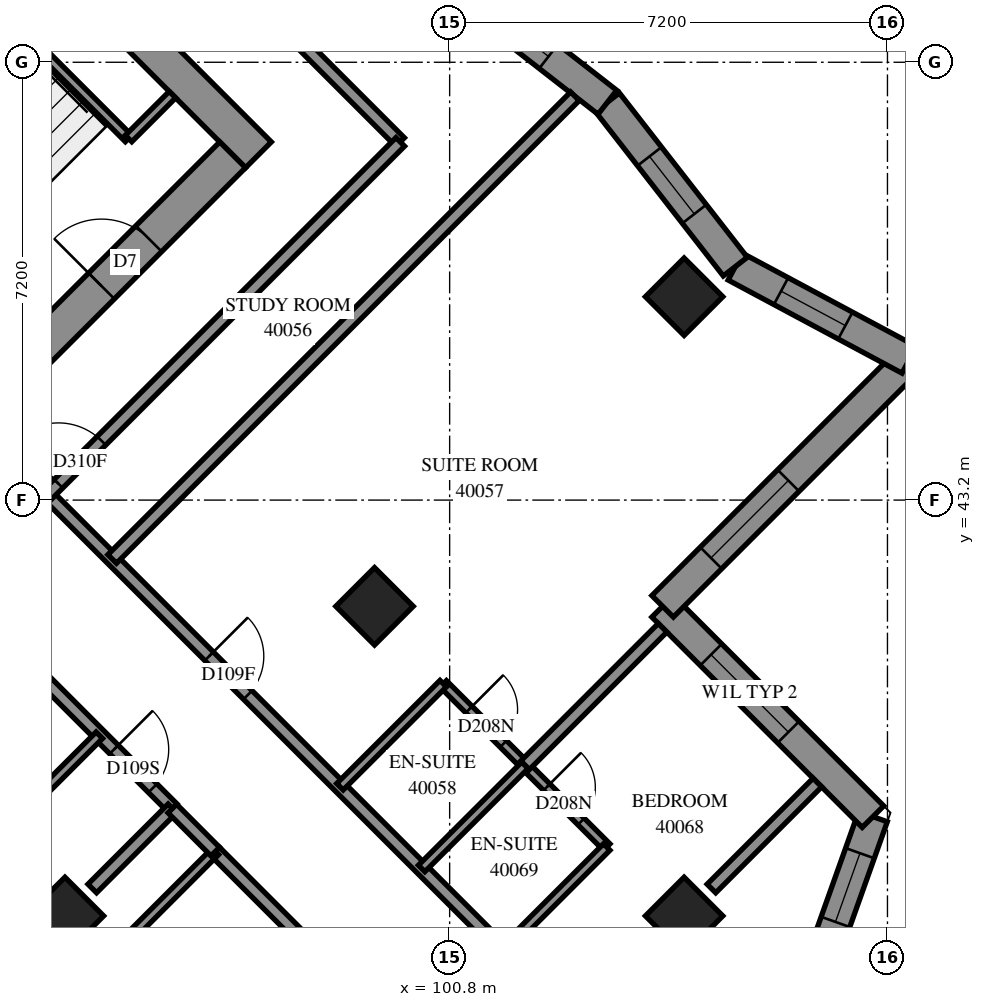
"""IFC4 building model, lengths in metres.
Left out: names, types, materials, properties, quantities, classifications, styles, units other than length and angle.
Written with IfcOpenShell. Run it as: python <this file> out.ifc"""

import sys

from ifc_helpers import new_model, si_unit, direction, frame, frame_2d, origin, origin_2d, place, context, subcontext, project, spatial, polyline, rectangle, outline, extrude, element, fill, save


model = new_model("IFC4")
c1 = context("Model", 3, precision=1e-05, world=origin(), true_north=direction((0.0, 1.0)))
c2 = subcontext(c1, "Body", "Model", "MODEL_VIEW")
j1 = project(units=[si_unit("LENGTHUNIT", "METRE"), si_unit("PLANEANGLEUNIT", "RADIAN")], contexts=[c1])
p1 = place(None, origin())
s1 = spatial("IfcSite", under=j1, at=p1, CompositionType="ELEMENT")
p2 = place(p1, origin())
s2 = spatial("IfcBuilding", under=s1, at=p2, CompositionType="ELEMENT")
p3 = place(p2, frame((0.0, 0.0, 149.0)))
s3 = spatial("IfcBuildingStorey", under=s2, at=p3, CompositionType="ELEMENT", Elevation=149.0)
for number, where, z_axis, x_axis in (
    (1, (104.656, 46.544, 0.0), (0.0, 0.0, 1.0), (0.707, -0.707, 0.0)),
    (2, (99.565, 41.453, 0.0), (0.0, 0.0, 1.0), (0.707, -0.707, 0.0)),
    (3, (94.474, 36.362, 0.0), (0.0, 0.0, 1.0), (0.707, -0.707, 0.0)),
    (4, (104.656, 36.362, 0.0), (0.0, 0.0, 1.0), (0.707, -0.707, 0.0)),
):
    element("IfcColumn", number, at=place(p3, frame(where, z_axis=z_axis, x_axis=x_axis)), inside=s3, PredefinedType="COLUMN", context=c2, shape_type="SweptSolid", body=[
        extrude(rectangle(XDim=0.9, YDim=0.9, at=origin_2d()), origin(), (0.0, 0.0, 1.0), 3.1),
    ])
p4 = place(p3, frame((86.625, 59.908, -0.3), z_axis=(0.0, 0.0, 1.0), x_axis=(0.7071067812, -0.7071067812, 0.0)))
e5 = element("IfcWall", 5, at=p4, inside=s3, PredefinedType="SHEAR", context=c2, shape_type="SweptSolid", body=[
    extrude(rectangle(XDim=15.6, YDim=0.6, at=frame_2d((7.8, 0.0))), origin(), (0.0, 0.0, 1.0), 2.7),
])
p5 = place(p4, frame((10.6, 0.0, 0.3)))
e6 = element("IfcOpeningElement", 6, at=p5, cuts=e5, PredefinedType="OPENING", context=c2, shape_type="SweptSolid", body=[
    extrude(rectangle(XDim=0.8, YDim=2.1, at=frame_2d((0.4, 1.05))), frame((0.0, 0.31, 0.0), z_axis=(0.0, -1.0, 0.0), x_axis=(1.0, 0.0, 0.0)), (0.0, 0.0, 1.0), 0.62),
])
p6 = place(p3, frame((87.049, 38.695, -0.3), z_axis=(0.0, 0.0, 1.0), x_axis=(0.7071067812, 0.7071067812, 0.0)))
e7 = element("IfcWall", 7, at=p6, inside=s3, PredefinedType="SHEAR", context=c2, shape_type="SweptSolid", body=[
    extrude(rectangle(XDim=14.4, YDim=0.6, at=frame_2d((7.2, 0.0))), origin(), (0.0, 0.0, 1.0), 2.7),
])
p7 = place(p6, frame((4.55, 0.0, 0.3)))
e8 = element("IfcOpeningElement", 8, at=p7, cuts=e7, PredefinedType="OPENING", context=c2, shape_type="SweptSolid", body=[
    extrude(rectangle(XDim=1.1, YDim=2.1, at=frame_2d((0.55, 1.05))), frame((0.0, 0.31, 0.0), z_axis=(0.0, -1.0, 0.0), x_axis=(1.0, 0.0, 0.0)), (0.0, 0.0, 1.0), 0.62),
])
p8 = place(p6, frame((11.35, 0.0, 0.3)))
e9 = element("IfcOpeningElement", 9, at=p8, cuts=e7, PredefinedType="OPENING", context=c2, shape_type="SweptSolid", body=[
    extrude(rectangle(XDim=1.1, YDim=2.1, at=frame_2d((0.55, 1.05))), frame((0.0, 0.31, 0.0), z_axis=(0.0, -1.0, 0.0), x_axis=(1.0, 0.0, 0.0)), (0.0, 0.0, 1.0), 0.62),
])
p9 = place(p3, frame((105.975, 32.978, 0.0), z_axis=(0.0, 0.0, 1.0), x_axis=(0.3355165031, 0.9420343285, 0.0)))
e10 = element("IfcWall", 10, at=p9, inside=s3, PredefinedType="SOLIDWALL", context=c2, shape_type="SweptSolid", body=[
    extrude(outline(polyline([(-0.114, -0.25), (5.482, -0.25), (5.166, 0.25), (0.114, 0.25), (-0.114, -0.25)])), origin(), (0.0, 0.0, 1.0), 3.1),
])
p10 = place(p9, frame((1.161, 0.0, 0.45)))
e11 = element("IfcOpeningElement", 11, at=p10, cuts=e10, PredefinedType="OPENING", context=c2, shape_type="SweptSolid", body=[
    extrude(rectangle(XDim=1.2, YDim=2.5, at=frame_2d((0.6, 1.25))), frame((0.0, 0.26, 0.0), z_axis=(0.0, -1.0, 0.0), x_axis=(1.0, 0.0, 0.0)), (0.0, 0.0, 1.0), 0.52),
])
p11 = place(p9, frame((3.487, 0.0, 0.45)))
e12 = element("IfcOpeningElement", 12, at=p11, cuts=e10, PredefinedType="OPENING", context=c2, shape_type="SweptSolid", body=[
    extrude(rectangle(XDim=1.2, YDim=2.5, at=frame_2d((0.6, 1.25))), frame((0.0, 0.26, 0.0), z_axis=(0.0, -1.0, 0.0), x_axis=(1.0, 0.0, 0.0)), (0.0, 0.0, 1.0), 0.52),
])
p12 = place(p3, frame((107.761, 37.994, 0.0), z_axis=(0.0, 0.0, 1.0), x_axis=(-0.7071272222, 0.7070863396, 0.0)))
e13 = element("IfcWall", 13, at=p12, inside=s3, PredefinedType="SOLIDWALL", context=c2, shape_type="SweptSolid", body=[
    extrude(outline(polyline([(-0.158, -0.25), (4.642, -0.25), (5.142, 0.25), (0.158, 0.25), (-0.158, -0.25)])), origin(), (0.0, 0.0, 1.0), 3.1),
])
p13 = place(p12, frame((1.967, 0.0, 0.6)))
e14 = element("IfcOpeningElement", 14, at=p13, cuts=e13, PredefinedType="OPENING", context=c2, shape_type="SweptSolid", body=[
    extrude(rectangle(XDim=1.8, YDim=1.9, at=frame_2d((0.9, 0.95))), frame((0.0, 0.26, 0.0), z_axis=(0.0, -1.0, 0.0), x_axis=(1.0, 0.0, 0.0)), (0.0, 0.0, 1.0), 0.52),
])
p14 = place(p3, frame((104.302, 41.453, 0.0), z_axis=(0.0, 0.0, 1.0), x_axis=(0.7071242197, 0.7070893422, 0.0)))
e15 = element("IfcWall", 15, at=p14, inside=s3, PredefinedType="SOLIDWALL", context=c2, shape_type="SweptSolid", body=[
    extrude(outline(polyline([(0.25, -0.25), (6.071, -0.25), (5.397, 0.25), (-0.25, 0.25), (0.25, -0.25)])), origin(), (0.0, 0.0, 1.0), 3.1),
])
p15 = place(p14, frame((1.125, 0.0, 0.6)))
e16 = element("IfcOpeningElement", 16, at=p15, cuts=e15, PredefinedType="OPENING", context=c2, shape_type="SweptSolid", body=[
    extrude(rectangle(XDim=1.8, YDim=1.9, at=frame_2d((0.9, 0.95))), frame((0.0, 0.26, 0.0), z_axis=(0.0, -1.0, 0.0), x_axis=(1.0, 0.0, 0.0)), (0.0, 0.0, 1.0), 0.52),
])
p16 = place(p3, frame((108.357, 45.508, 0.0), z_axis=(0.0, 0.0, 1.0), x_axis=(-0.8815024249, 0.4721794944, 0.0)))
e17 = element("IfcWall", 17, at=p16, inside=s3, PredefinedType="SOLIDWALL", context=c2, shape_type="SweptSolid", body=[
    extrude(outline(polyline([(-0.337, -0.25), (3.191, -0.25), (3.297, 0.25), (0.337, 0.25), (-0.337, -0.25)])), origin(), (0.0, 0.0, 1.0), 3.1),
])
p17 = place(p16, frame((1.19, 0.0, 0.45)))
e18 = element("IfcOpeningElement", 18, at=p17, cuts=e17, PredefinedType="OPENING", context=c2, shape_type="SweptSolid", body=[
    extrude(rectangle(XDim=1.2, YDim=2.5, at=frame_2d((0.6, 1.25))), frame((0.0, 0.26, 0.0), z_axis=(0.0, -1.0, 0.0), x_axis=(1.0, 0.0, 0.0)), (0.0, 0.0, 1.0), 0.52),
])
p18 = place(p3, frame((105.498, 47.039, 0.0), z_axis=(0.0, 0.0, 1.0), x_axis=(-0.6141912527, 0.7891572119, 0.0)))
e19 = element("IfcWall", 19, at=p18, inside=s3, PredefinedType="SOLIDWALL", context=c2, shape_type="SweptSolid", body=[
    extrude(outline(polyline([(0.053, -0.25), (3.456, -0.25), (3.393, 0.25), (-0.053, 0.25), (0.053, -0.25)])), origin(), (0.0, 0.0, 1.0), 3.1),
])
p19 = place(p18, frame((1.097, 0.0, 0.45)))
e20 = element("IfcOpeningElement", 20, at=p19, cuts=e19, PredefinedType="OPENING", context=c2, shape_type="SweptSolid", body=[
    extrude(rectangle(XDim=1.2, YDim=2.5, at=frame_2d((0.6, 1.25))), frame((0.0, 0.26, 0.0), z_axis=(0.0, -1.0, 0.0), x_axis=(1.0, 0.0, 0.0)), (0.0, 0.0, 1.0), 0.52),
])
p20 = place(p3, frame((103.394, 49.742, 0.0), z_axis=(0.0, 0.0, 1.0), x_axis=(-0.7891622864, 0.6141847326, 0.0)))
e21 = element("IfcWall", 21, at=p20, inside=s3, PredefinedType="SOLIDWALL", context=c2, shape_type="SweptSolid", body=[
    extrude(outline(polyline([(-0.031, -0.25), (3.372, -0.25), (3.434, 0.25), (0.031, 0.25), (-0.031, -0.25)])), origin(), (0.0, 0.0, 1.0), 3.1),
])
p21 = place(p20, frame((1.226, 0.0, 0.45)))
e22 = element("IfcOpeningElement", 22, at=p21, cuts=e21, PredefinedType="OPENING", context=c2, shape_type="SweptSolid", body=[
    extrude(rectangle(XDim=1.2, YDim=2.5, at=frame_2d((0.6, 1.25))), frame((0.0, 0.26, 0.0), z_axis=(0.0, -1.0, 0.0), x_axis=(1.0, 0.0, 0.0)), (0.0, 0.0, 1.0), 0.52),
])
p22 = place(p3, frame((91.313, 53.354, 0.0), z_axis=(0.0, 0.0, 1.0), x_axis=(0.7071067812, -0.7071067812, 0.0)))
e23 = element("IfcWall", 23, at=p22, inside=s3, PredefinedType="PARTITIONING", context=c2, shape_type="SweptSolid", body=[
    extrude(rectangle(XDim=5.95, YDim=0.15, at=frame_2d((2.975, 0.0))), origin(), (0.0, 0.0, 1.0), 3.1),
])
p23 = place(p3, frame((95.52, 49.146, 0.0), z_axis=(0.0, 0.0, 1.0), x_axis=(0.7071067812, 0.7071067812, 0.0)))
e24 = element("IfcWall", 24, at=p23, inside=s3, PredefinedType="PARTITIONING", context=c2, shape_type="SweptSolid", body=[
    extrude(rectangle(XDim=1.02, YDim=0.15, at=frame_2d((0.51, 0.0))), origin(), (0.0, 0.0, 1.0), 3.1),
])
p24 = place(p3, frame((94.189, 43.287, 0.0), z_axis=(0.0, 0.0, 1.0), x_axis=(0.7071067812, -0.7071067812, 0.0)))
e25 = element("IfcWall", 25, at=p24, inside=s3, PredefinedType="PARTITIONING", context=c2, shape_type="SweptSolid", body=[
    extrude(rectangle(XDim=12.298, YDim=0.2, at=frame_2d((6.149, 0.0))), origin(), (0.0, 0.0, 1.0), 3.1),
])
p25 = place(p24, frame((3.755, 0.0, 0.0)))
e26 = element("IfcOpeningElement", 26, at=p25, cuts=e25, PredefinedType="OPENING", context=c2, shape_type="SweptSolid", body=[
    extrude(rectangle(XDim=0.9, YDim=2.1, at=frame_2d((0.45, 1.05))), frame((0.0, 0.11, 0.0), z_axis=(0.0, -1.0, 0.0), x_axis=(1.0, 0.0, 0.0)), (0.0, 0.0, 1.0), 0.22),
])
p26 = place(p24, frame((10.998, 0.0, 0.0)))
e27 = element("IfcOpeningElement", 27, at=p26, cuts=e25, PredefinedType="OPENING", context=c2, shape_type="SweptSolid", body=[
    extrude(rectangle(XDim=0.9, YDim=2.1, at=frame_2d((0.45, 1.05))), frame((0.0, 0.11, 0.0), z_axis=(0.0, -1.0, 0.0), x_axis=(1.0, 0.0, 0.0)), (0.0, 0.0, 1.0), 0.22),
])
p27 = place(p3, frame((91.755, 57.317, 0.0), z_axis=(0.0, 0.0, 1.0), x_axis=(0.7071067812, -0.7071067812, 0.0)))
e28 = element("IfcWall", 28, at=p27, inside=s3, PredefinedType="PARTITIONING", context=c2, shape_type="SweptSolid", body=[
    extrude(rectangle(XDim=11.639, YDim=0.2, at=frame_2d((5.819, 0.0))), origin(), (0.0, 0.0, 1.0), 3.1),
])
p28 = place(p3, frame((95.25, 42.232, 0.0), z_axis=(0.0, 0.0, 1.0), x_axis=(0.7071114274, 0.7071021349, 0.0)))
e29 = element("IfcWall", 29, at=p28, inside=s3, PredefinedType="PARTITIONING", context=c2, shape_type="SweptSolid", body=[
    extrude(rectangle(XDim=10.761, YDim=0.2, at=frame_2d((5.381, 0.0))), origin(), (0.0, 0.0, 1.0), 3.1),
])
p29 = place(p3, frame((94.19, 43.292, 0.0), z_axis=(0.0, 0.0, 1.0), x_axis=(0.7071067812, 0.7071067812, 0.0)))
e30 = element("IfcWall", 30, at=p29, inside=s3, PredefinedType="PARTITIONING", context=c2, shape_type="SweptSolid", body=[
    extrude(rectangle(XDim=8.2, YDim=0.2, at=frame_2d((4.1, 0.0))), origin(), (0.0, 0.0, 1.0), 3.1),
])
p30 = place(p29, frame((0.251, 0.0, 0.0)))
e31 = element("IfcOpeningElement", 31, at=p30, cuts=e30, PredefinedType="OPENING", context=c2, shape_type="SweptSolid", body=[
    extrude(rectangle(XDim=1.0, YDim=2.1, at=frame_2d((0.5, 1.05))), frame((0.0, 0.11, 0.0), z_axis=(0.0, -1.0, 0.0), x_axis=(1.0, 0.0, 0.0)), (0.0, 0.0, 1.0), 0.22),
])
p31 = place(p3, frame((92.639, 41.739, 0.0), z_axis=(0.0, 0.0, 1.0), x_axis=(0.7071067812, -0.7071067812, 0.0)))
e32 = element("IfcWall", 32, at=p31, inside=s3, PredefinedType="PARTITIONING", context=c2, shape_type="SweptSolid", body=[
    extrude(rectangle(XDim=5.1, YDim=0.2, at=frame_2d((2.55, 0.0))), origin(), (0.0, 0.0, 1.0), 3.1),
])
p32 = place(p31, frame((0.123, 0.0, 0.0)))
e33 = element("IfcOpeningElement", 33, at=p32, cuts=e32, PredefinedType="OPENING", context=c2, shape_type="SweptSolid", body=[
    extrude(rectangle(XDim=1.0, YDim=2.1, at=frame_2d((0.5, 1.05))), frame((0.0, 0.11, 0.0), z_axis=(0.0, -1.0, 0.0), x_axis=(1.0, 0.0, 0.0)), (0.0, 0.0, 1.0), 0.22),
])
p33 = place(p31, frame((3.734, 0.0, 0.0)))
e34 = element("IfcOpeningElement", 34, at=p33, cuts=e32, PredefinedType="OPENING", context=c2, shape_type="SweptSolid", body=[
    extrude(rectangle(XDim=0.9, YDim=2.1, at=frame_2d((0.45, 1.05))), frame((0.0, 0.11, 0.0), z_axis=(0.0, -1.0, 0.0), x_axis=(1.0, 0.0, 0.0)), (0.0, 0.0, 1.0), 0.22),
])
p34 = place(p3, frame((100.694, 40.178, 0.0), z_axis=(0.0, 0.0, 1.0), x_axis=(0.7076329021, -0.7065802685, 0.0)))
e35 = element("IfcWall", 35, at=p34, inside=s3, PredefinedType="PARTITIONING", context=c2, shape_type="SweptSolid", body=[
    extrude(rectangle(XDim=3.8, YDim=0.15, at=frame_2d((1.9, 0.0))), origin(), (0.0, 0.0, 1.0), 3.1),
])
p35 = place(p34, frame((0.598, 0.0, 0.0)))
e36 = element("IfcOpeningElement", 36, at=p35, cuts=e35, PredefinedType="OPENING", context=c2, shape_type="SweptSolid", body=[
    extrude(rectangle(XDim=0.8, YDim=2.1, at=frame_2d((0.4, 1.05))), frame((0.0, 0.085, 0.0), z_axis=(0.0, -1.0, 0.0), x_axis=(1.0, 0.0, 0.0)), (0.0, 0.0, 1.0), 0.17),
])
p36 = place(p34, frame((2.405, 0.0, 0.0)))
e37 = element("IfcOpeningElement", 37, at=p36, cuts=e35, PredefinedType="OPENING", context=c2, shape_type="SweptSolid", body=[
    extrude(rectangle(XDim=0.8, YDim=2.1, at=frame_2d((0.4, 1.05))), frame((0.0, 0.085, 0.0), z_axis=(0.0, -1.0, 0.0), x_axis=(1.0, 0.0, 0.0)), (0.0, 0.0, 1.0), 0.17),
])
p37 = place(p3, frame((102.04, 38.838, 0.0), z_axis=(0.0, 0.0, 1.0), x_axis=(0.7071067812, 0.7071067812, 0.0)))
e38 = element("IfcWall", 38, at=p37, inside=s3, PredefinedType="PARTITIONING", context=c2, shape_type="SweptSolid", body=[
    extrude(rectangle(XDim=3.199, YDim=0.2, at=frame_2d((1.599, 0.0))), origin(), (0.0, 0.0, 1.0), 3.1),
])
p38 = place(p3, frame((96.945, 37.419, 0.0), z_axis=(0.0, 0.0, 1.0), x_axis=(0.7071067812, -0.7071067812, 0.0)))
e39 = element("IfcWall", 39, at=p38, inside=s3, PredefinedType="PARTITIONING", context=c2, shape_type="SweptSolid", body=[
    extrude(rectangle(XDim=2.927, YDim=0.2, at=frame_2d((1.464, 0.0))), origin(), (0.0, 0.0, 1.0), 3.1),
])
p39 = place(p3, frame((105.105, 36.813, 0.0), z_axis=(0.0, 0.0, 1.0), x_axis=(0.7071067812, 0.7071067812, 0.0)))
e40 = element("IfcWall", 40, at=p39, inside=s3, PredefinedType="PARTITIONING", context=c2, shape_type="SweptSolid", body=[
    extrude(rectangle(XDim=2.463, YDim=0.2, at=frame_2d((1.232, 0.0))), origin(), (0.0, 0.0, 1.0), 3.1),
])
for number, where, z_axis, x_axis in (
    (41, (93.341, 37.635, 0.0), (0.0, 0.0, 1.0), (0.707, 0.707, 0.0)),
    (42, (101.685, 35.797, 0.0), (0.0, 0.0, 1.0), (0.707, 0.707, 0.0)),
):
    element("IfcWall", number, at=place(p3, frame(where, z_axis=z_axis, x_axis=x_axis)), inside=s3, PredefinedType="PARTITIONING", context=c2, shape_type="SweptSolid", body=[
        extrude(rectangle(XDim=2.401, YDim=0.15, at=frame_2d((1.201, 0.0))), origin(), (0.0, 0.0, 1.0), 3.1),
    ])
for number, where, z_axis, x_axis in (
    (43, (100.34, 37.142, 0.0), (0.0, 0.0, 1.0), (0.708, 0.707, 0.0)),
    (44, (98.996, 38.486, 0.0), (0.0, 0.0, 1.0), (0.708, 0.707, 0.0)),
):
    element("IfcWall", number, at=place(p3, frame(where, z_axis=z_axis, x_axis=x_axis)), inside=s3, PredefinedType="PARTITIONING", context=c2, shape_type="SweptSolid", body=[
        extrude(rectangle(XDim=2.4, YDim=0.15, at=frame_2d((1.2, 0.0))), origin(), (0.0, 0.0, 1.0), 3.1),
    ])
p40 = place(p3, frame((95.251, 35.727, 0.0), z_axis=(0.0, 0.0, 1.0), x_axis=(0.7071067812, 0.7071067812, 0.0)))
e45 = element("IfcWall", 45, at=p40, inside=s3, PredefinedType="PARTITIONING", context=c2, shape_type="SweptSolid", body=[
    extrude(rectangle(XDim=2.398, YDim=0.15, at=frame_2d((1.199, 0.0))), origin(), (0.0, 0.0, 1.0), 3.1),
])
p41 = place(p3, frame((94.923, 36.813, 0.0), z_axis=(0.0, 0.0, 1.0), x_axis=(0.7071067812, 0.7071067812, 0.0)))
e46 = element("IfcWall", 46, at=p41, inside=s3, PredefinedType="PARTITIONING", context=c2, shape_type="SweptSolid", body=[
    extrude(rectangle(XDim=1.864, YDim=0.2, at=frame_2d((0.932, 0.0))), origin(), (0.0, 0.0, 1.0), 3.1),
])
p42 = place(p3, frame((96.24, 38.128, 0.0), z_axis=(0.0, 0.0, 1.0), x_axis=(0.7061059238, -0.7081062239, 0.0)))
e47 = element("IfcWall", 47, at=p42, inside=s3, PredefinedType="PARTITIONING", context=c2, shape_type="SweptSolid", body=[
    extrude(rectangle(XDim=1.0, YDim=0.2, at=frame_2d((0.5, 0.0))), origin(), (0.0, 0.0, 1.0), 3.1),
])
p43 = place(p11, origin())
e48 = element("IfcWindow", 48, at=p43, inside=s3, PartitioningType="SINGLE_PANEL", PredefinedType="WINDOW", context=c2, shape_type="SweptSolid", body=[
    extrude(rectangle(XDim=1.2, YDim=2.5, at=frame_2d((0.6, 1.25))), frame((0.0, 0.18, 0.0), z_axis=(0.0, -1.0, 0.0), x_axis=(1.0, 0.0, 0.0)), (0.0, 0.0, 1.0), 0.06),
])
fill(e12, e48)
p44 = place(p13, origin())
e49 = element("IfcWindow", 49, at=p44, inside=s3, PartitioningType="SINGLE_PANEL", PredefinedType="WINDOW", context=c2, shape_type="SweptSolid", body=[
    extrude(rectangle(XDim=1.8, YDim=1.9, at=frame_2d((0.9, 0.95))), frame((0.0, 0.18, 0.0), z_axis=(0.0, -1.0, 0.0), x_axis=(1.0, 0.0, 0.0)), (0.0, 0.0, 1.0), 0.06),
])
fill(e14, e49)
p45 = place(p15, origin())
e50 = element("IfcWindow", 50, at=p45, inside=s3, PartitioningType="SINGLE_PANEL", PredefinedType="WINDOW", context=c2, shape_type="SweptSolid", body=[
    extrude(rectangle(XDim=1.8, YDim=1.9, at=frame_2d((0.9, 0.95))), frame((0.0, 0.18, 0.0), z_axis=(0.0, -1.0, 0.0), x_axis=(1.0, 0.0, 0.0)), (0.0, 0.0, 1.0), 0.06),
])
fill(e16, e50)
p46 = place(p17, origin())
e51 = element("IfcWindow", 51, at=p46, inside=s3, PartitioningType="SINGLE_PANEL", PredefinedType="WINDOW", context=c2, shape_type="SweptSolid", body=[
    extrude(rectangle(XDim=1.2, YDim=2.5, at=frame_2d((0.6, 1.25))), frame((0.0, 0.18, 0.0), z_axis=(0.0, -1.0, 0.0), x_axis=(1.0, 0.0, 0.0)), (0.0, 0.0, 1.0), 0.06),
])
fill(e18, e51)
p47 = place(p19, origin())
e52 = element("IfcWindow", 52, at=p47, inside=s3, PartitioningType="SINGLE_PANEL", PredefinedType="WINDOW", context=c2, shape_type="SweptSolid", body=[
    extrude(rectangle(XDim=1.2, YDim=2.5, at=frame_2d((0.6, 1.25))), frame((0.0, 0.18, 0.0), z_axis=(0.0, -1.0, 0.0), x_axis=(1.0, 0.0, 0.0)), (0.0, 0.0, 1.0), 0.06),
])
fill(e20, e52)
p48 = place(p21, origin())
e53 = element("IfcWindow", 53, at=p48, inside=s3, PartitioningType="SINGLE_PANEL", PredefinedType="WINDOW", context=c2, shape_type="SweptSolid", body=[
    extrude(rectangle(XDim=1.2, YDim=2.5, at=frame_2d((0.6, 1.25))), frame((0.0, 0.18, 0.0), z_axis=(0.0, -1.0, 0.0), x_axis=(1.0, 0.0, 0.0)), (0.0, 0.0, 1.0), 0.06),
])
fill(e22, e53)
p49 = place(p8, origin())
e54 = element("IfcDoor", 54, at=p49, inside=s3, OperationType="SINGLE_SWING_RIGHT", PredefinedType="DOOR", context=c2, shape_type="SweptSolid", body=[
    extrude(rectangle(XDim=1.1, YDim=2.1, at=frame_2d((0.55, 1.05))), frame((0.0, 0.025, 0.0), z_axis=(0.0, -1.0, 0.0), x_axis=(1.0, 0.0, 0.0)), (0.0, 0.0, 1.0), 0.05),
])
fill(e9, e54)
p50 = place(p30, origin())
e55 = element("IfcDoor", 55, at=p50, inside=s3, OperationType="SINGLE_SWING_RIGHT", PredefinedType="DOOR", context=c2, shape_type="SweptSolid", body=[
    extrude(rectangle(XDim=1.0, YDim=2.1, at=frame_2d((0.5, 1.05))), frame((0.0, 0.025, 0.0), z_axis=(0.0, -1.0, 0.0), x_axis=(1.0, 0.0, 0.0)), (0.0, 0.0, 1.0), 0.05),
])
fill(e31, e55)
p51 = place(p25, origin())
e56 = element("IfcDoor", 56, at=p51, inside=s3, OperationType="SINGLE_SWING_RIGHT", PredefinedType="DOOR", context=c2, shape_type="SweptSolid", body=[
    extrude(rectangle(XDim=0.9, YDim=2.1, at=frame_2d((0.45, 1.05))), frame((0.0, 0.025, 0.0), z_axis=(0.0, -1.0, 0.0), x_axis=(1.0, 0.0, 0.0)), (0.0, 0.0, 1.0), 0.05),
])
fill(e26, e56)
p52 = place(p35, origin())
e57 = element("IfcDoor", 57, at=p52, inside=s3, OperationType="SINGLE_SWING_RIGHT", PredefinedType="DOOR", context=c2, shape_type="SweptSolid", body=[
    extrude(rectangle(XDim=0.8, YDim=2.1, at=frame_2d((0.4, 1.05))), frame((0.0, 0.025, 0.0), z_axis=(0.0, -1.0, 0.0), x_axis=(1.0, 0.0, 0.0)), (0.0, 0.0, 1.0), 0.05),
])
fill(e36, e57)
p53 = place(p33, origin())
e58 = element("IfcDoor", 58, at=p53, inside=s3, OperationType="SINGLE_SWING_LEFT", PredefinedType="DOOR", context=c2, shape_type="SweptSolid", body=[
    extrude(rectangle(XDim=0.9, YDim=2.1, at=frame_2d((0.45, 1.05))), frame((0.0, 0.025, 0.0), z_axis=(0.0, -1.0, 0.0), x_axis=(1.0, 0.0, 0.0)), (0.0, 0.0, 1.0), 0.05),
])
fill(e34, e58)
p54 = place(p36, origin())
e59 = element("IfcDoor", 59, at=p54, inside=s3, OperationType="SINGLE_SWING_RIGHT", PredefinedType="DOOR", context=c2, shape_type="SweptSolid", body=[
    extrude(rectangle(XDim=0.8, YDim=2.1, at=frame_2d((0.4, 1.05))), frame((0.0, 0.025, 0.0), z_axis=(0.0, -1.0, 0.0), x_axis=(1.0, 0.0, 0.0)), (0.0, 0.0, 1.0), 0.05),
])
fill(e37, e59)
save(model, sys.argv[1])
